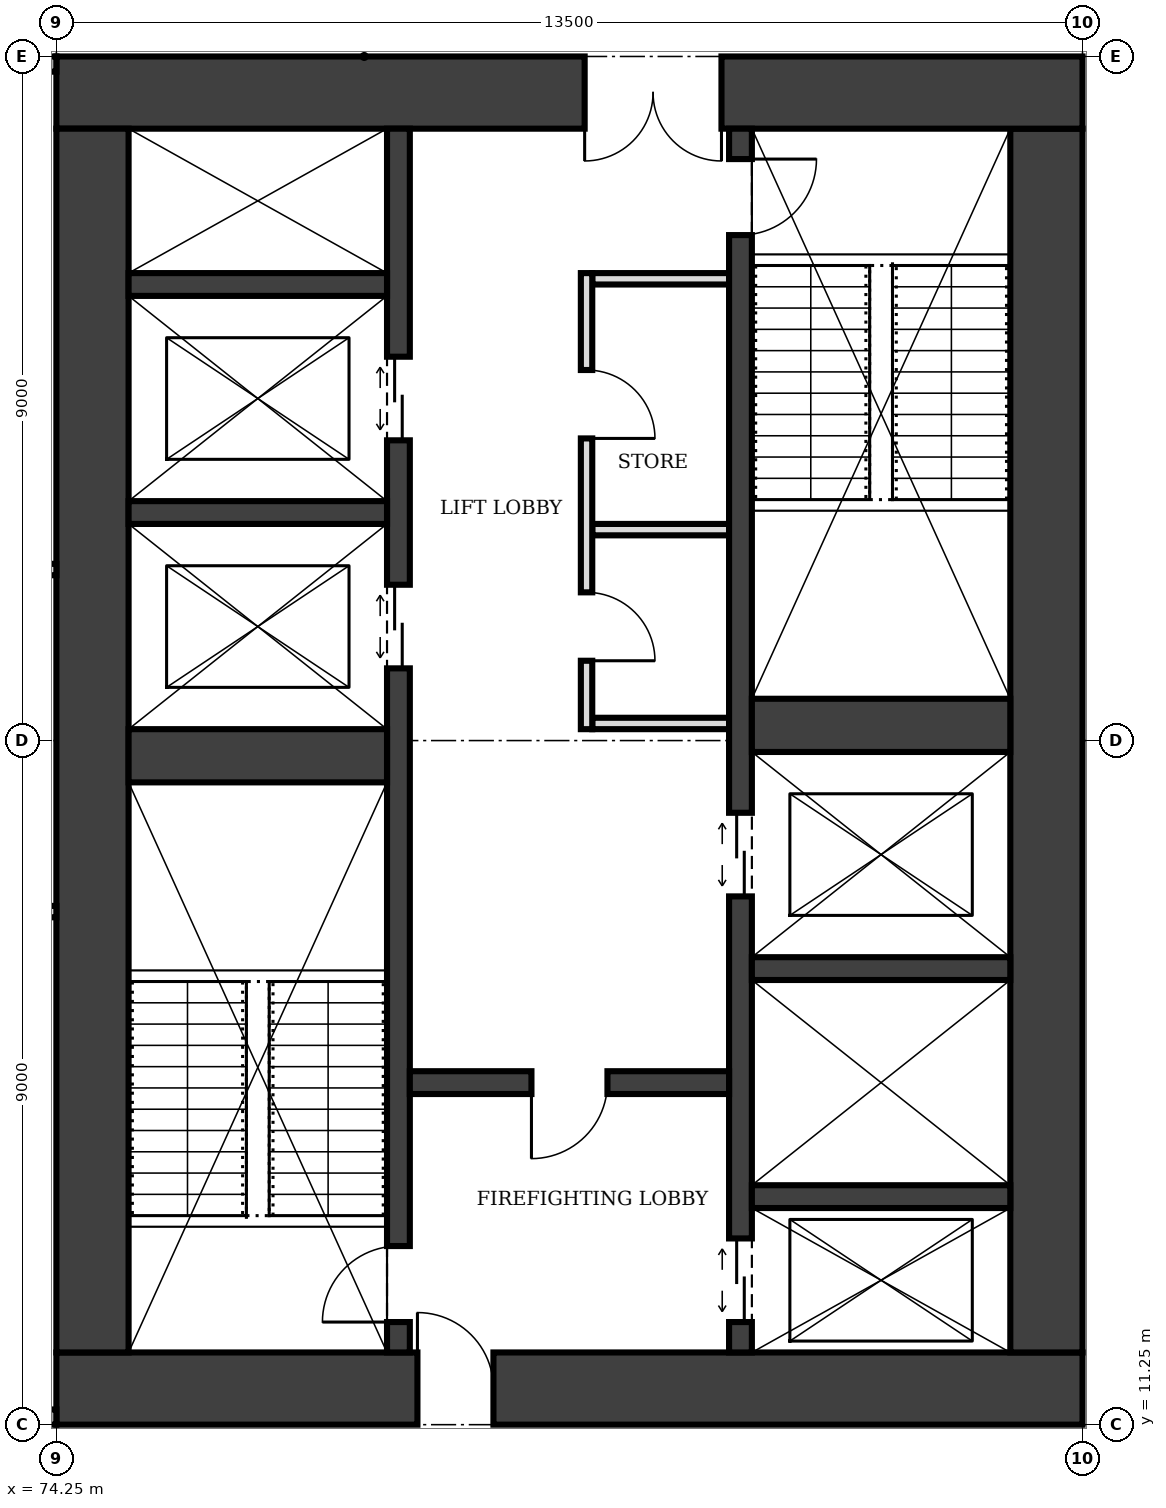
"""IFC4 building model, lengths in metres.
Left out: names, types, materials, properties, quantities, classifications, styles, units other than length and angle.
Written with IfcOpenShell. Run it as: python <this file> out.ifc"""

import sys

from ifc_helpers import new_model, si_unit, direction, frame, frame_2d, origin, place, context, subcontext, project, spatial, rectangle, extrude, element, fill, save


model = new_model("IFC4")
c1 = context("Model", 3, precision=1e-05, world=origin(), true_north=direction((0.0, 1.0)))
c2 = subcontext(c1, "Body", "Model", "MODEL_VIEW")
j1 = project(units=[si_unit("LENGTHUNIT", "METRE"), si_unit("PLANEANGLEUNIT", "RADIAN")], contexts=[c1])
p1 = place(None, origin())
s1 = spatial("IfcSite", under=j1, at=p1, CompositionType="ELEMENT")
p2 = place(p1, origin())
s2 = spatial("IfcBuilding", under=s1, at=p2, CompositionType="ELEMENT")
p3 = place(p2, frame((0.0, 0.0, 101.0)))
s3 = spatial("IfcBuildingStorey", under=s2, at=p3, CompositionType="ELEMENT", Elevation=101.0)
p4 = place(p3, frame((74.25, 11.725, 0.0), z_axis=(0.0, 0.0, 1.0), x_axis=(1.0, 0.0, 0.0)))
e1 = element("IfcWall", 1, at=p4, inside=s3, PredefinedType="SHEAR", context=c2, shape_type="SweptSolid", body=[
    extrude(rectangle(XDim=13.5, YDim=0.95, at=frame_2d((6.75, 0.0))), origin(), (0.0, 0.0, 1.0), 4.0),
])
p5 = place(p4, frame((4.75, 0.0, 0.0)))
e2 = element("IfcOpeningElement", 2, at=p5, cuts=e1, PredefinedType="OPENING", context=c2, shape_type="SweptSolid", body=[
    extrude(rectangle(XDim=1.0, YDim=2.1, at=frame_2d((0.5, 1.05))), frame((0.0, 0.485, 0.0), z_axis=(0.0, -1.0, 0.0), x_axis=(1.0, 0.0, 0.0)), (0.0, 0.0, 1.0), 0.97),
])
p6 = place(p3, frame((87.275, 12.2, 0.0), z_axis=(0.0, 0.0, 1.0), x_axis=(0.0, 1.0, 0.0)))
e3 = element("IfcWall", 3, at=p6, inside=s3, PredefinedType="SHEAR", context=c2, shape_type="SweptSolid", body=[
    extrude(rectangle(XDim=16.1, YDim=0.95, at=frame_2d((8.05, 0.0))), origin(), (0.0, 0.0, 1.0), 4.0),
])
p7 = place(p3, frame((87.75, 28.775, 0.0), z_axis=(0.0, 0.0, 1.0), x_axis=(-1.0, 0.0, 0.0)))
e4 = element("IfcWall", 4, at=p7, inside=s3, PredefinedType="SHEAR", context=c2, shape_type="SweptSolid", body=[
    extrude(rectangle(XDim=13.5, YDim=0.95, at=frame_2d((6.75, 0.0))), origin(), (0.0, 0.0, 1.0), 4.0),
])
p8 = place(p7, frame((4.75, 0.0, 0.0)))
e5 = element("IfcOpeningElement", 5, at=p8, cuts=e4, PredefinedType="OPENING", context=c2, shape_type="SweptSolid", body=[
    extrude(rectangle(XDim=1.8, YDim=2.1, at=frame_2d((0.9, 1.05))), frame((0.0, 0.485, 0.0), z_axis=(0.0, -1.0, 0.0), x_axis=(1.0, 0.0, 0.0)), (0.0, 0.0, 1.0), 0.97),
])
p9 = place(p3, frame((74.725, 28.3, 0.0), z_axis=(0.0, 0.0, 1.0), x_axis=(0.0, -1.0, 0.0)))
e6 = element("IfcWall", 6, at=p9, inside=s3, PredefinedType="SHEAR", context=c2, shape_type="SweptSolid", body=[
    extrude(rectangle(XDim=16.1, YDim=0.95, at=frame_2d((8.05, 0.0))), origin(), (0.0, 0.0, 1.0), 4.0),
])
p10 = place(p3, frame((78.75, 12.2, 0.0), z_axis=(0.0, 0.0, 1.0), x_axis=(0.0, 1.0, 0.0)))
e7 = element("IfcWall", 7, at=p10, inside=s3, PredefinedType="SHEAR", context=c2, shape_type="SweptSolid", body=[
    extrude(rectangle(XDim=16.1, YDim=0.3, at=frame_2d((8.05, 0.0))), origin(), (0.0, 0.0, 1.0), 4.0),
])
p11 = place(p10, frame((0.4, 0.0, 0.0)))
e8 = element("IfcOpeningElement", 8, at=p11, cuts=e7, PredefinedType="OPENING", context=c2, shape_type="SweptSolid", body=[
    extrude(rectangle(XDim=1.0, YDim=2.1, at=frame_2d((0.5, 1.05))), frame((0.0, 0.16, 0.0), z_axis=(0.0, -1.0, 0.0), x_axis=(1.0, 0.0, 0.0)), (0.0, 0.0, 1.0), 0.32),
])
p12 = place(p10, frame((9.0, 0.0, 0.0)))
e9 = element("IfcOpeningElement", 9, at=p12, cuts=e7, PredefinedType="OPENING", context=c2, shape_type="SweptSolid", body=[
    extrude(rectangle(XDim=1.1, YDim=2.1, at=frame_2d((0.55, 1.05))), frame((0.0, 0.16, 0.0), z_axis=(0.0, -1.0, 0.0), x_axis=(1.0, 0.0, 0.0)), (0.0, 0.0, 1.0), 0.32),
])
p13 = place(p10, frame((12.0, 0.0, 0.0)))
e10 = element("IfcOpeningElement", 10, at=p13, cuts=e7, PredefinedType="OPENING", context=c2, shape_type="SweptSolid", body=[
    extrude(rectangle(XDim=1.1, YDim=2.1, at=frame_2d((0.55, 1.05))), frame((0.0, 0.16, 0.0), z_axis=(0.0, -1.0, 0.0), x_axis=(1.0, 0.0, 0.0)), (0.0, 0.0, 1.0), 0.32),
])
p14 = place(p3, frame((83.25, 12.2, 0.0), z_axis=(0.0, 0.0, 1.0), x_axis=(0.0, 1.0, 0.0)))
e11 = element("IfcWall", 11, at=p14, inside=s3, PredefinedType="SHEAR", context=c2, shape_type="SweptSolid", body=[
    extrude(rectangle(XDim=16.1, YDim=0.3, at=frame_2d((8.05, 0.0))), origin(), (0.0, 0.0, 1.0), 4.0),
])
p15 = place(p14, frame((14.7, 0.0, 0.0)))
e12 = element("IfcOpeningElement", 12, at=p15, cuts=e11, PredefinedType="OPENING", context=c2, shape_type="SweptSolid", body=[
    extrude(rectangle(XDim=1.0, YDim=2.1, at=frame_2d((0.5, 1.05))), frame((0.0, 0.16, 0.0), z_axis=(0.0, -1.0, 0.0), x_axis=(1.0, 0.0, 0.0)), (0.0, 0.0, 1.0), 0.32),
])
p16 = place(p14, frame((0.4, 0.0, 0.0)))
e13 = element("IfcOpeningElement", 13, at=p16, cuts=e11, PredefinedType="OPENING", context=c2, shape_type="SweptSolid", body=[
    extrude(rectangle(XDim=1.1, YDim=2.1, at=frame_2d((0.55, 1.05))), frame((0.0, 0.16, 0.0), z_axis=(0.0, -1.0, 0.0), x_axis=(1.0, 0.0, 0.0)), (0.0, 0.0, 1.0), 0.32),
])
p17 = place(p14, frame((6.0, 0.0, 0.0)))
e14 = element("IfcOpeningElement", 14, at=p17, cuts=e11, PredefinedType="OPENING", context=c2, shape_type="SweptSolid", body=[
    extrude(rectangle(XDim=1.1, YDim=2.1, at=frame_2d((0.55, 1.05))), frame((0.0, 0.16, 0.0), z_axis=(0.0, -1.0, 0.0), x_axis=(1.0, 0.0, 0.0)), (0.0, 0.0, 1.0), 0.32),
])
p18 = place(p3, frame((75.2, 20.05, 0.0), z_axis=(0.0, 0.0, 1.0), x_axis=(1.0, 0.0, 0.0)))
e15 = element("IfcWall", 15, at=p18, inside=s3, PredefinedType="SHEAR", context=c2, shape_type="SweptSolid", body=[
    extrude(rectangle(XDim=3.4, YDim=0.7, at=frame_2d((1.7, 0.0))), origin(), (0.0, 0.0, 1.0), 4.0),
])
p19 = place(p3, frame((78.9, 15.75, 0.0), z_axis=(0.0, 0.0, 1.0), x_axis=(1.0, 0.0, 0.0)))
e16 = element("IfcWall", 16, at=p19, inside=s3, PredefinedType="SHEAR", context=c2, shape_type="SweptSolid", body=[
    extrude(rectangle(XDim=4.2, YDim=0.3, at=frame_2d((2.1, 0.0))), origin(), (0.0, 0.0, 1.0), 4.0),
])
p20 = place(p19, frame((1.6, 0.0, 0.0)))
e17 = element("IfcOpeningElement", 17, at=p20, cuts=e16, PredefinedType="OPENING", context=c2, shape_type="SweptSolid", body=[
    extrude(rectangle(XDim=1.0, YDim=2.1, at=frame_2d((0.5, 1.05))), frame((0.0, 0.16, 0.0), z_axis=(0.0, -1.0, 0.0), x_axis=(1.0, 0.0, 0.0)), (0.0, 0.0, 1.0), 0.32),
])
for number, where, z_axis, x_axis in (
    (18, (83.4, 14.25, 0.0), (0.0, 0.0, 1.0), (1.0, 0.0, 0.0)),
    (19, (83.4, 17.25, 0.0), (0.0, 0.0, 1.0), (1.0, 0.0, 0.0)),
):
    element("IfcWall", number, at=place(p3, frame(where, z_axis=z_axis, x_axis=x_axis)), inside=s3, PredefinedType="SHEAR", context=c2, shape_type="SweptSolid", body=[
        extrude(rectangle(XDim=3.4, YDim=0.3, at=frame_2d((1.7, 0.0))), origin(), (0.0, 0.0, 1.0), 4.0),
    ])
p21 = place(p3, frame((83.4, 20.45, 0.0), z_axis=(0.0, 0.0, 1.0), x_axis=(1.0, 0.0, 0.0)))
e20 = element("IfcWall", 20, at=p21, inside=s3, PredefinedType="SHEAR", context=c2, shape_type="SweptSolid", body=[
    extrude(rectangle(XDim=3.4, YDim=0.7, at=frame_2d((1.7, 0.0))), origin(), (0.0, 0.0, 1.0), 4.0),
])
for number, where, z_axis, x_axis in (
    (21, (75.2, 23.25, 0.0), (0.0, 0.0, 1.0), (1.0, 0.0, 0.0)),
    (22, (75.2, 26.25, 0.0), (0.0, 0.0, 1.0), (1.0, 0.0, 0.0)),
):
    element("IfcWall", number, at=place(p3, frame(where, z_axis=z_axis, x_axis=x_axis)), inside=s3, PredefinedType="SHEAR", context=c2, shape_type="SweptSolid", body=[
        extrude(rectangle(XDim=3.4, YDim=0.3, at=frame_2d((1.7, 0.0))), origin(), (0.0, 0.0, 1.0), 4.0),
    ])
p22 = place(p3, frame((81.225, 20.4, 0.0), z_axis=(0.0, 0.0, 1.0), x_axis=(0.0, 1.0, 0.0)))
e23 = element("IfcWall", 23, at=p22, inside=s3, PredefinedType="PARTITIONING", context=c2, shape_type="SweptSolid", body=[
    extrude(rectangle(XDim=6.0, YDim=0.15, at=frame_2d((3.0, 0.0))), origin(), (0.0, 0.0, 1.0), 3.75),
])
p23 = place(p22, frame((0.9, 0.0, 0.0)))
e24 = element("IfcOpeningElement", 24, at=p23, cuts=e23, PredefinedType="OPENING", context=c2, shape_type="SweptSolid", body=[
    extrude(rectangle(XDim=0.9, YDim=2.1, at=frame_2d((0.45, 1.05))), frame((0.0, 0.085, 0.0), z_axis=(0.0, -1.0, 0.0), x_axis=(1.0, 0.0, 0.0)), (0.0, 0.0, 1.0), 0.17),
])
p24 = place(p22, frame((3.825, 0.0, 0.0)))
e25 = element("IfcOpeningElement", 25, at=p24, cuts=e23, PredefinedType="OPENING", context=c2, shape_type="SweptSolid", body=[
    extrude(rectangle(XDim=0.9, YDim=2.1, at=frame_2d((0.45, 1.05))), frame((0.0, 0.085, 0.0), z_axis=(0.0, -1.0, 0.0), x_axis=(1.0, 0.0, 0.0)), (0.0, 0.0, 1.0), 0.17),
])
for number, where, z_axis, x_axis in (
    (26, (81.3, 20.475, 0.0), (0.0, 0.0, 1.0), (1.0, 0.0, 0.0)),
    (27, (81.3, 23.025, 0.0), (0.0, 0.0, 1.0), (1.0, 0.0, 0.0)),
    (28, (81.3, 26.325, 0.0), (0.0, 0.0, 1.0), (1.0, 0.0, 0.0)),
):
    element("IfcWall", number, at=place(p3, frame(where, z_axis=z_axis, x_axis=x_axis)), inside=s3, PredefinedType="PARTITIONING", context=c2, shape_type="SweptSolid", body=[
        extrude(rectangle(XDim=1.8, YDim=0.15, at=frame_2d((0.9, 0.0))), origin(), (0.0, 0.0, 1.0), 3.75),
    ])
for number, where, z_axis, x_axis in (
    (29, (68.57, 11.35, 0.0), (0.0, 0.0, 1.0), (1.0, 0.0, 0.0)),
    (30, (68.57, 29.15, 0.0), (0.0, 0.0, 1.0), (1.0, 0.0, 0.0)),
):
    element("IfcWall", number, at=place(p3, frame(where, z_axis=z_axis, x_axis=x_axis)), inside=s3, PredefinedType="SOLIDWALL", context=c2, shape_type="SweptSolid", body=[
        extrude(rectangle(XDim=5.68, YDim=0.2, at=frame_2d((2.84, 0.0))), origin(), (0.0, 0.0, 1.0), 3.75),
    ])
for number, where, z_axis, x_axis in (
    (31, (65.15, 18.0, 0.0), (0.0, 0.0, 1.0), (1.0, 0.0, 0.0)),
    (32, (65.15, 22.5, 0.0), (0.0, 0.0, 1.0), (1.0, 0.0, 0.0)),
):
    element("IfcWall", number, at=place(p3, frame(where, z_axis=z_axis, x_axis=x_axis)), inside=s3, PredefinedType="PARTITIONING", context=c2, shape_type="SweptSolid", body=[
        extrude(rectangle(XDim=9.1, YDim=0.15, at=frame_2d((4.55, 0.0))), origin(), (0.0, 0.0, 1.0), 3.75),
    ])
p25 = place(p5, origin())
e33 = element("IfcDoor", 33, at=p25, inside=s3, OperationType="SINGLE_SWING_LEFT", PredefinedType="DOOR", context=c2, shape_type="SweptSolid", body=[
    extrude(rectangle(XDim=1.0, YDim=2.1, at=frame_2d((0.5, 1.05))), frame((0.0, 0.025, 0.0), z_axis=(0.0, -1.0, 0.0), x_axis=(1.0, 0.0, 0.0)), (0.0, 0.0, 1.0), 0.05),
])
fill(e2, e33)
p26 = place(p8, origin())
e34 = element("IfcDoor", 34, at=p26, inside=s3, OperationType="DOUBLE_DOOR_SINGLE_SWING", PredefinedType="DOOR", context=c2, shape_type="SweptSolid", body=[
    extrude(rectangle(XDim=1.8, YDim=2.1, at=frame_2d((0.9, 1.05))), frame((0.0, 0.025, 0.0), z_axis=(0.0, -1.0, 0.0), x_axis=(1.0, 0.0, 0.0)), (0.0, 0.0, 1.0), 0.05),
])
fill(e5, e34)
p27 = place(p20, frame((1.0, 0.0, 0.0), z_axis=(0.0, 0.0, 1.0), x_axis=(-1.0, 0.0, 0.0)))
e35 = element("IfcDoor", 35, at=p27, inside=s3, OperationType="SINGLE_SWING_RIGHT", PredefinedType="DOOR", context=c2, shape_type="SweptSolid", body=[
    extrude(rectangle(XDim=1.0, YDim=2.1, at=frame_2d((0.5, 1.05))), frame((0.0, 0.025, 0.0), z_axis=(0.0, -1.0, 0.0), x_axis=(1.0, 0.0, 0.0)), (0.0, 0.0, 1.0), 0.05),
])
fill(e17, e35)
p28 = place(p11, origin())
e36 = element("IfcDoor", 36, at=p28, inside=s3, OperationType="SINGLE_SWING_LEFT", PredefinedType="DOOR", context=c2, shape_type="SweptSolid", body=[
    extrude(rectangle(XDim=1.0, YDim=2.1, at=frame_2d((0.5, 1.05))), frame((0.0, 0.025, 0.0), z_axis=(0.0, -1.0, 0.0), x_axis=(1.0, 0.0, 0.0)), (0.0, 0.0, 1.0), 0.05),
])
fill(e8, e36)
p29 = place(p15, frame((1.0, 0.0, 0.0), z_axis=(0.0, 0.0, 1.0), x_axis=(-1.0, 0.0, 0.0)))
e37 = element("IfcDoor", 37, at=p29, inside=s3, OperationType="SINGLE_SWING_LEFT", PredefinedType="DOOR", context=c2, shape_type="SweptSolid", body=[
    extrude(rectangle(XDim=1.0, YDim=2.1, at=frame_2d((0.5, 1.05))), frame((0.0, 0.025, 0.0), z_axis=(0.0, -1.0, 0.0), x_axis=(1.0, 0.0, 0.0)), (0.0, 0.0, 1.0), 0.05),
])
fill(e12, e37)
p30 = place(p16, origin())
e38 = element("IfcDoor", 38, at=p30, inside=s3, OperationType="DOUBLE_DOOR_SLIDING", PredefinedType="DOOR", context=c2, shape_type="SweptSolid", body=[
    extrude(rectangle(XDim=1.1, YDim=2.1, at=frame_2d((0.55, 1.05))), frame((0.0, 0.025, 0.0), z_axis=(0.0, -1.0, 0.0), x_axis=(1.0, 0.0, 0.0)), (0.0, 0.0, 1.0), 0.05),
])
fill(e13, e38)
p31 = place(p12, origin())
e39 = element("IfcDoor", 39, at=p31, inside=s3, OperationType="DOUBLE_DOOR_SLIDING", PredefinedType="DOOR", context=c2, shape_type="SweptSolid", body=[
    extrude(rectangle(XDim=1.1, YDim=2.1, at=frame_2d((0.55, 1.05))), frame((0.0, 0.025, 0.0), z_axis=(0.0, -1.0, 0.0), x_axis=(1.0, 0.0, 0.0)), (0.0, 0.0, 1.0), 0.05),
])
fill(e9, e39)
p32 = place(p13, origin())
e40 = element("IfcDoor", 40, at=p32, inside=s3, OperationType="DOUBLE_DOOR_SLIDING", PredefinedType="DOOR", context=c2, shape_type="SweptSolid", body=[
    extrude(rectangle(XDim=1.1, YDim=2.1, at=frame_2d((0.55, 1.05))), frame((0.0, 0.025, 0.0), z_axis=(0.0, -1.0, 0.0), x_axis=(1.0, 0.0, 0.0)), (0.0, 0.0, 1.0), 0.05),
])
fill(e10, e40)
p33 = place(p17, origin())
e41 = element("IfcDoor", 41, at=p33, inside=s3, OperationType="DOUBLE_DOOR_SLIDING", PredefinedType="DOOR", context=c2, shape_type="SweptSolid", body=[
    extrude(rectangle(XDim=1.1, YDim=2.1, at=frame_2d((0.55, 1.05))), frame((0.0, 0.025, 0.0), z_axis=(0.0, -1.0, 0.0), x_axis=(1.0, 0.0, 0.0)), (0.0, 0.0, 1.0), 0.05),
])
fill(e14, e41)
p34 = place(p23, frame((0.9, 0.0, 0.0), z_axis=(0.0, 0.0, 1.0), x_axis=(-1.0, 0.0, 0.0)))
e42 = element("IfcDoor", 42, at=p34, inside=s3, OperationType="SINGLE_SWING_RIGHT", PredefinedType="DOOR", context=c2, shape_type="SweptSolid", body=[
    extrude(rectangle(XDim=0.9, YDim=2.1, at=frame_2d((0.45, 1.05))), frame((0.0, 0.025, 0.0), z_axis=(0.0, -1.0, 0.0), x_axis=(1.0, 0.0, 0.0)), (0.0, 0.0, 1.0), 0.05),
])
fill(e24, e42)
p35 = place(p24, frame((0.9, 0.0, 0.0), z_axis=(0.0, 0.0, 1.0), x_axis=(-1.0, 0.0, 0.0)))
e43 = element("IfcDoor", 43, at=p35, inside=s3, OperationType="SINGLE_SWING_RIGHT", PredefinedType="DOOR", context=c2, shape_type="SweptSolid", body=[
    extrude(rectangle(XDim=0.9, YDim=2.1, at=frame_2d((0.45, 1.05))), frame((0.0, 0.025, 0.0), z_axis=(0.0, -1.0, 0.0), x_axis=(1.0, 0.0, 0.0)), (0.0, 0.0, 1.0), 0.05),
])
fill(e25, e43)
save(model, sys.argv[1])
